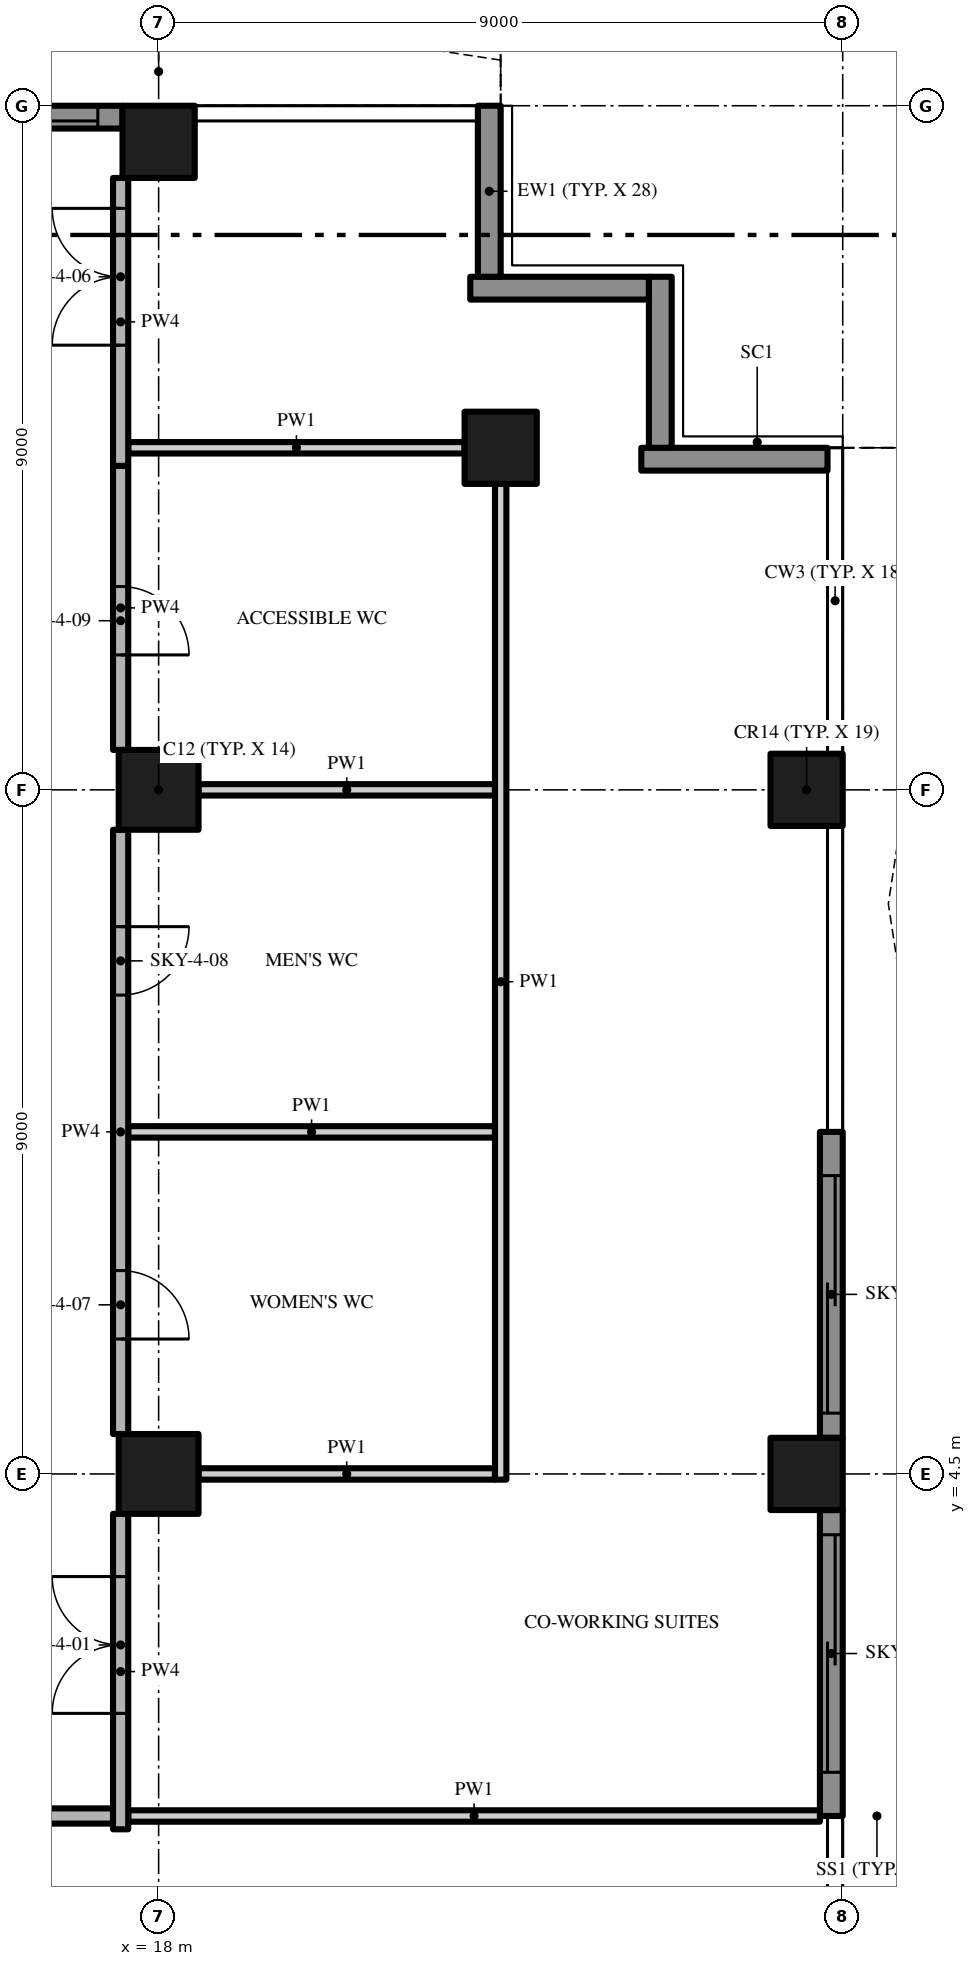
"""IFC4 building model, lengths in metres.
Left out: names, types, materials, properties, quantities, classifications, styles, units other than length and angle.
Written with IfcOpenShell. Run it as: python <this file> out.ifc"""

import sys

from ifc_helpers import new_model, si_unit, direction, frame, frame_2d, origin, origin_2d, place, context, subcontext, project, spatial, polyline, rectangle, outline, extrude, element, fill, save


model = new_model("IFC4")
c1 = context("Model", 3, precision=1e-05, world=origin(), true_north=direction((0.0, 1.0)))
c2 = subcontext(c1, "Body", "Model", "MODEL_VIEW")
j1 = project(units=[si_unit("LENGTHUNIT", "METRE"), si_unit("PLANEANGLEUNIT", "RADIAN")], contexts=[c1])
p1 = place(None, origin())
s1 = spatial("IfcSite", under=j1, at=p1, CompositionType="ELEMENT")
p2 = place(p1, origin())
s2 = spatial("IfcBuilding", under=s1, at=p2, CompositionType="ELEMENT")
p3 = place(p2, frame((0.0, 0.0, 233.8)))
s3 = spatial("IfcBuildingStorey", under=s2, at=p3, CompositionType="ELEMENT", Elevation=233.8)
p4 = place(p3, frame((18.0, 13.5, 0.0), z_axis=(0.0, 0.0, 1.0), x_axis=(1.0, 0.0, 0.0)))
e1 = element("IfcColumn", 1, at=p4, inside=s3, PredefinedType="COLUMN", context=c2, shape_type="SweptSolid", body=[
    extrude(rectangle(XDim=1.05, YDim=1.05, at=origin_2d()), origin(), (0.0, 0.0, 1.0), 4.7),
])
p5 = place(p3, frame((18.0, 22.025, 0.0), z_axis=(0.0, 0.0, 1.0), x_axis=(1.0, 0.0, 0.0)))
e2 = element("IfcColumn", 2, at=p5, inside=s3, PredefinedType="COLUMN", context=c2, shape_type="SweptSolid", body=[
    extrude(rectangle(XDim=0.95, YDim=0.95, at=origin_2d()), origin(), (0.0, 0.0, 1.0), 4.7),
])
p6 = place(p3, frame((18.0, 4.5, 0.0), z_axis=(0.0, 0.0, 1.0), x_axis=(1.0, 0.0, 0.0)))
e3 = element("IfcColumn", 3, at=p6, inside=s3, PredefinedType="COLUMN", context=c2, shape_type="SweptSolid", body=[
    extrude(rectangle(XDim=1.05, YDim=1.05, at=origin_2d()), origin(), (0.0, 0.0, 1.0), 4.7),
])
for number, where, z_axis, x_axis in (
    (4, (26.525, 13.5, 0.0), (0.0, 0.0, 1.0), (1.0, 0.0, 0.0)),
    (5, (22.5, 18.0, 0.0), (0.0, 0.0, 1.0), (1.0, 0.0, 0.0)),
    (6, (26.525, 4.5, 0.0), (0.0, 0.0, 1.0), (1.0, 0.0, 0.0)),
):
    element("IfcColumn", number, at=place(p3, frame(where, z_axis=z_axis, x_axis=x_axis)), inside=s3, PredefinedType="COLUMN", context=c2, shape_type="SweptSolid", body=[
        extrude(rectangle(XDim=0.95, YDim=0.95, at=origin_2d()), origin(), (0.0, 0.0, 1.0), 4.7),
    ])
p7 = place(p3, frame((26.85, 4.025, 0.0), z_axis=(0.0, 0.0, 1.0), x_axis=(0.0, -1.0, 0.0)))
e7 = element("IfcWall", 7, at=p7, inside=s3, PredefinedType="SOLIDWALL", context=c2, shape_type="SweptSolid", body=[
    extrude(rectangle(XDim=4.025, YDim=0.3, at=frame_2d((2.013, 0.0))), origin(), (0.0, 0.0, 1.0), 4.7),
])
p8 = place(p7, frame((0.325, 0.0, 0.0)))
e8 = element("IfcOpeningElement", 8, at=p8, cuts=e7, PredefinedType="OPENING", context=c2, shape_type="SweptSolid", body=[
    extrude(rectangle(XDim=3.125, YDim=2.4, at=frame_2d((1.562, 1.2))), frame((0.0, 0.16, 0.0), z_axis=(0.0, -1.0, 0.0), x_axis=(1.0, 0.0, 0.0)), (0.0, 0.0, 1.0), 0.32),
])
p9 = place(p3, frame((26.85, 9.0, 0.0), z_axis=(0.0, 0.0, 1.0), x_axis=(0.0, -1.0, 0.0)))
e9 = element("IfcWall", 9, at=p9, inside=s3, PredefinedType="SOLIDWALL", context=c2, shape_type="SweptSolid", body=[
    extrude(rectangle(XDim=4.025, YDim=0.3, at=frame_2d((2.013, 0.0))), origin(), (0.0, 0.0, 1.0), 4.7),
])
p10 = place(p9, frame((0.575, 0.0, 0.0)))
e10 = element("IfcOpeningElement", 10, at=p10, cuts=e9, PredefinedType="OPENING", context=c2, shape_type="SweptSolid", body=[
    extrude(rectangle(XDim=3.125, YDim=2.4, at=frame_2d((1.562, 1.2))), frame((0.0, 0.16, 0.0), z_axis=(0.0, -1.0, 0.0), x_axis=(1.0, 0.0, 0.0)), (0.0, 0.0, 1.0), 0.32),
])
p11 = place(p3, frame((24.35, 17.85, 0.0), z_axis=(0.0, 0.0, 1.0), x_axis=(1.0, 0.0, 0.0)))
e11 = element("IfcWall", 11, at=p11, inside=s3, PredefinedType="SOLIDWALL", context=c2, shape_type="SweptSolid", body=[
    extrude(rectangle(XDim=2.45, YDim=0.3, at=frame_2d((1.225, 0.0))), origin(), (0.0, 0.0, 1.0), 4.7),
])
p12 = place(p3, frame((24.6, 20.25, 0.0), z_axis=(0.0, 0.0, 1.0), x_axis=(0.0, -1.0, 0.0)))
e12 = element("IfcWall", 12, at=p12, inside=s3, PredefinedType="SOLIDWALL", context=c2, shape_type="SweptSolid", body=[
    extrude(rectangle(XDim=2.25, YDim=0.3, at=frame_2d((1.125, 0.0))), origin(), (0.0, 0.0, 1.0), 4.7),
])
p13 = place(p3, frame((22.1, 20.1, 0.0), z_axis=(0.0, 0.0, 1.0), x_axis=(1.0, 0.0, 0.0)))
e13 = element("IfcWall", 13, at=p13, inside=s3, PredefinedType="SOLIDWALL", context=c2, shape_type="SweptSolid", body=[
    extrude(rectangle(XDim=2.35, YDim=0.3, at=frame_2d((1.175, 0.0))), origin(), (0.0, 0.0, 1.0), 4.7),
])
p14 = place(p3, frame((22.35, 22.5, 0.0), z_axis=(0.0, 0.0, 1.0), x_axis=(0.0, -1.0, 0.0)))
e14 = element("IfcWall", 14, at=p14, inside=s3, PredefinedType="SOLIDWALL", context=c2, shape_type="SweptSolid", body=[
    extrude(rectangle(XDim=2.25, YDim=0.3, at=frame_2d((1.125, 0.0))), origin(), (0.0, 0.0, 1.0), 4.7),
])
p15 = place(p3, frame((13.5, 22.35, 0.0), z_axis=(0.0, 0.0, 1.0), x_axis=(1.0, 0.0, 0.0)))
e15 = element("IfcWall", 15, at=p15, inside=s3, PredefinedType="SOLIDWALL", context=c2, shape_type="SweptSolid", body=[
    extrude(rectangle(XDim=4.025, YDim=0.3, at=frame_2d((2.013, 0.0))), origin(), (0.0, 0.0, 1.0), 4.7),
])
p16 = place(p15, frame((0.575, 0.0, 0.0)))
e16 = element("IfcOpeningElement", 16, at=p16, cuts=e15, PredefinedType="OPENING", context=c2, shape_type="SweptSolid", body=[
    extrude(rectangle(XDim=3.125, YDim=2.4, at=frame_2d((1.562, 1.2))), frame((0.0, 0.16, 0.0), z_axis=(0.0, -1.0, 0.0), x_axis=(1.0, 0.0, 0.0)), (0.0, 0.0, 1.0), 0.32),
])
p17 = place(p3, origin())
e17 = element("IfcWall", 17, at=p17, inside=s3, PredefinedType="USERDEFINED", context=c2, shape_type="SweptSolid", body=[
    extrude(outline(polyline([(27.6, -18.0), (27.829, -16.5), (28.429, -15.0), (29.171, -13.5), (29.771, -12.0), (30.0, -10.5), (29.771, -9.0), (29.171, -7.5), (28.429, -6.0), (27.829, -4.5), (27.6, -3.0), (27.829, -1.5), (28.429, 0.0), (29.171, 1.5), (29.771, 3.0), (30.0, 4.5), (29.771, 6.0), (29.171, 7.5), (28.429, 9.0), (27.829, 10.5), (27.6, 12.0), (27.829, 13.5), (28.429, 15.0), (29.171, 16.5), (29.771, 18.0), (29.539, 18.093), (28.942, 16.602), (28.201, 15.102), (27.586, 13.566), (27.347, 12.0), (27.586, 10.434), (28.201, 8.898), (28.942, 7.398), (29.528, 5.934), (29.747, 4.5), (29.528, 3.066), (28.942, 1.602), (28.201, 0.102), (27.586, -1.434), (27.347, -3.0), (27.586, -4.566), (28.201, -6.102), (28.942, -7.602), (29.528, -9.066), (29.747, -10.5), (29.528, -11.934), (28.942, -13.398), (28.201, -14.898), (27.586, -16.434), (27.353, -17.962), (27.6, -18.0)])), origin(), (0.0, 0.0, 1.0), 0.9),
])
p18 = place(p3, origin())
e18 = element("IfcWall", 18, at=p18, inside=s3, PredefinedType="USERDEFINED", context=c2, shape_type="SweptSolid", body=[
    extrude(outline(polyline([(22.5, 23.1), (21.0, 23.329), (19.5, 23.929), (18.0, 24.671), (16.5, 25.271), (15.0, 25.5), (13.5, 25.271), (13.538, 25.024), (15.0, 25.247), (16.434, 25.028), (17.898, 24.442), (19.398, 23.701), (20.934, 23.086), (22.462, 22.853), (22.5, 23.1)])), origin(), (0.0, 0.0, 1.0), 0.9),
])
p19 = place(p3, frame((-17.4, 0.0, 0.0), z_axis=(0.0, 0.0, 1.0), x_axis=(1.0, 0.0, 0.0)))
e19 = element("IfcWall", 19, at=p19, inside=s3, PredefinedType="PARTITIONING", context=c2, shape_type="SweptSolid", body=[
    extrude(rectangle(XDim=34.8, YDim=0.2, at=frame_2d((17.4, 0.0))), origin(), (0.0, 0.0, 1.0), 4.7),
])
p20 = place(p19, frame((3.15, 0.0, 0.0)))
e20 = element("IfcOpeningElement", 20, at=p20, cuts=e19, PredefinedType="OPENING", context=c2, shape_type="SweptSolid", body=[
    extrude(rectangle(XDim=2.0, YDim=2.4, at=frame_2d((1.0, 1.2))), frame((0.0, 0.11, 0.0), z_axis=(0.0, -1.0, 0.0), x_axis=(1.0, 0.0, 0.0)), (0.0, 0.0, 1.0), 0.22),
])
p21 = place(p19, frame((16.4, 0.0, 0.0)))
e21 = element("IfcOpeningElement", 21, at=p21, cuts=e19, PredefinedType="OPENING", context=c2, shape_type="SweptSolid", body=[
    extrude(rectangle(XDim=2.0, YDim=2.4, at=frame_2d((1.0, 1.2))), frame((0.0, 0.11, 0.0), z_axis=(0.0, -1.0, 0.0), x_axis=(1.0, 0.0, 0.0)), (0.0, 0.0, 1.0), 0.22),
])
p22 = place(p19, frame((29.65, 0.0, 0.0)))
e22 = element("IfcOpeningElement", 22, at=p22, cuts=e19, PredefinedType="OPENING", context=c2, shape_type="SweptSolid", body=[
    extrude(rectangle(XDim=2.0, YDim=2.4, at=frame_2d((1.0, 1.2))), frame((0.0, 0.11, 0.0), z_axis=(0.0, -1.0, 0.0), x_axis=(1.0, 0.0, 0.0)), (0.0, 0.0, 1.0), 0.22),
])
p23 = place(p3, frame((17.6, 0.0, 0.0), z_axis=(0.0, 0.0, 1.0), x_axis=(1.0, 0.0, 0.0)))
e23 = element("IfcWall", 23, at=p23, inside=s3, PredefinedType="PARTITIONING", context=c2, shape_type="SweptSolid", body=[
    extrude(rectangle(XDim=9.1, YDim=0.15, at=frame_2d((4.55, 0.0))), origin(), (0.0, 0.0, 1.0), 4.7),
])
p24 = place(p3, frame((18.525, 4.5, 0.0), z_axis=(0.0, 0.0, 1.0), x_axis=(1.0, 0.0, 0.0)))
e24 = element("IfcWall", 24, at=p24, inside=s3, PredefinedType="PARTITIONING", context=c2, shape_type="SweptSolid", body=[
    extrude(rectangle(XDim=3.9, YDim=0.15, at=frame_2d((1.95, 0.0))), origin(), (0.0, 0.0, 1.0), 4.7),
])
p25 = place(p3, frame((17.6, 9.0, 0.0), z_axis=(0.0, 0.0, 1.0), x_axis=(1.0, 0.0, 0.0)))
e25 = element("IfcWall", 25, at=p25, inside=s3, PredefinedType="PARTITIONING", context=c2, shape_type="SweptSolid", body=[
    extrude(rectangle(XDim=4.825, YDim=0.15, at=frame_2d((2.413, 0.0))), origin(), (0.0, 0.0, 1.0), 4.7),
])
p26 = place(p3, frame((18.525, 13.5, 0.0), z_axis=(0.0, 0.0, 1.0), x_axis=(1.0, 0.0, 0.0)))
e26 = element("IfcWall", 26, at=p26, inside=s3, PredefinedType="PARTITIONING", context=c2, shape_type="SweptSolid", body=[
    extrude(rectangle(XDim=3.9, YDim=0.15, at=frame_2d((1.95, 0.0))), origin(), (0.0, 0.0, 1.0), 4.7),
])
p27 = place(p3, frame((17.6, 18.0, 0.0), z_axis=(0.0, 0.0, 1.0), x_axis=(1.0, 0.0, 0.0)))
e27 = element("IfcWall", 27, at=p27, inside=s3, PredefinedType="PARTITIONING", context=c2, shape_type="SweptSolid", body=[
    extrude(rectangle(XDim=4.425, YDim=0.15, at=frame_2d((2.212, 0.0))), origin(), (0.0, 0.0, 1.0), 4.7),
])
p28 = place(p3, frame((17.5, -0.175, 0.0), z_axis=(0.0, 0.0, 1.0), x_axis=(0.0, 1.0, 0.0)))
e28 = element("IfcWall", 28, at=p28, inside=s3, PredefinedType="PARTITIONING", context=c2, shape_type="SweptSolid", body=[
    extrude(rectangle(XDim=4.15, YDim=0.2, at=frame_2d((2.075, 0.0))), origin(), (0.0, 0.0, 1.0), 4.7),
])
p29 = place(p28, frame((1.525, 0.0, 0.0)))
e29 = element("IfcOpeningElement", 29, at=p29, cuts=e28, PredefinedType="OPENING", context=c2, shape_type="SweptSolid", body=[
    extrude(rectangle(XDim=1.8, YDim=2.4, at=frame_2d((0.9, 1.2))), frame((0.0, 0.11, 0.0), z_axis=(0.0, -1.0, 0.0), x_axis=(1.0, 0.0, 0.0)), (0.0, 0.0, 1.0), 0.22),
])
p30 = place(p3, frame((17.5, 12.975, 0.0), z_axis=(0.0, 0.0, 1.0), x_axis=(0.0, -1.0, 0.0)))
e30 = element("IfcWall", 30, at=p30, inside=s3, PredefinedType="PARTITIONING", context=c2, shape_type="SweptSolid", body=[
    extrude(rectangle(XDim=7.95, YDim=0.2, at=frame_2d((3.975, 0.0))), origin(), (0.0, 0.0, 1.0), 4.7),
])
p31 = place(p30, frame((5.8, 0.0, 0.0)))
e31 = element("IfcOpeningElement", 31, at=p31, cuts=e30, PredefinedType="OPENING", context=c2, shape_type="SweptSolid", body=[
    extrude(rectangle(XDim=0.9, YDim=2.1, at=frame_2d((0.45, 1.05))), frame((0.0, 0.11, 0.0), z_axis=(0.0, -1.0, 0.0), x_axis=(1.0, 0.0, 0.0)), (0.0, 0.0, 1.0), 0.22),
])
p32 = place(p30, frame((1.275, 0.0, 0.0)))
e32 = element("IfcOpeningElement", 32, at=p32, cuts=e30, PredefinedType="OPENING", context=c2, shape_type="SweptSolid", body=[
    extrude(rectangle(XDim=0.9, YDim=2.1, at=frame_2d((0.45, 1.05))), frame((0.0, 0.11, 0.0), z_axis=(0.0, -1.0, 0.0), x_axis=(1.0, 0.0, 0.0)), (0.0, 0.0, 1.0), 0.22),
])
p33 = place(p3, frame((17.5, 17.762, 0.0), z_axis=(0.0, 0.0, 1.0), x_axis=(0.0, -1.0, 0.0)))
e33 = element("IfcWall", 33, at=p33, inside=s3, PredefinedType="PARTITIONING", context=c2, shape_type="SweptSolid", body=[
    extrude(rectangle(XDim=3.737, YDim=0.2, at=frame_2d((1.869, 0.0))), origin(), (0.0, 0.0, 1.0), 4.7),
])
p34 = place(p33, frame((1.587, 0.0, 0.0)))
e34 = element("IfcOpeningElement", 34, at=p34, cuts=e33, PredefinedType="OPENING", context=c2, shape_type="SweptSolid", body=[
    extrude(rectangle(XDim=0.9, YDim=2.1, at=frame_2d((0.45, 1.05))), frame((0.0, 0.11, 0.0), z_axis=(0.0, -1.0, 0.0), x_axis=(1.0, 0.0, 0.0)), (0.0, 0.0, 1.0), 0.22),
])
p35 = place(p3, frame((17.5, 17.762, 0.0), z_axis=(0.0, 0.0, 1.0), x_axis=(0.0, 1.0, 0.0)))
e35 = element("IfcWall", 35, at=p35, inside=s3, PredefinedType="PARTITIONING", context=c2, shape_type="SweptSolid", body=[
    extrude(rectangle(XDim=3.788, YDim=0.2, at=frame_2d((1.894, 0.0))), origin(), (0.0, 0.0, 1.0), 4.7),
])
p36 = place(p35, frame((1.587, 0.0, 0.0)))
e36 = element("IfcOpeningElement", 36, at=p36, cuts=e35, PredefinedType="OPENING", context=c2, shape_type="SweptSolid", body=[
    extrude(rectangle(XDim=1.8, YDim=2.4, at=frame_2d((0.9, 1.2))), frame((0.0, 0.11, 0.0), z_axis=(0.0, -1.0, 0.0), x_axis=(1.0, 0.0, 0.0)), (0.0, 0.0, 1.0), 0.22),
])
p37 = place(p3, frame((22.5, 4.425, 0.0), z_axis=(0.0, 0.0, 1.0), x_axis=(0.0, 1.0, 0.0)))
e37 = element("IfcWall", 37, at=p37, inside=s3, PredefinedType="PARTITIONING", context=c2, shape_type="SweptSolid", body=[
    extrude(rectangle(XDim=13.1, YDim=0.15, at=frame_2d((6.55, 0.0))), origin(), (0.0, 0.0, 1.0), 4.7),
])
p38 = place(p8, origin())
e38 = element("IfcDoor", 38, at=p38, inside=s3, OperationType="SINGLE_SWING_LEFT", PredefinedType="DOOR", context=c2, shape_type="SweptSolid", body=[
    extrude(rectangle(XDim=3.125, YDim=2.4, at=frame_2d((1.562, 1.2))), frame((0.0, 0.025, 0.0), z_axis=(0.0, -1.0, 0.0), x_axis=(1.0, 0.0, 0.0)), (0.0, 0.0, 1.0), 0.05),
])
fill(e8, e38)
p39 = place(p10, origin())
e39 = element("IfcDoor", 39, at=p39, inside=s3, OperationType="SINGLE_SWING_LEFT", PredefinedType="DOOR", context=c2, shape_type="SweptSolid", body=[
    extrude(rectangle(XDim=3.125, YDim=2.4, at=frame_2d((1.562, 1.2))), frame((0.0, 0.025, 0.0), z_axis=(0.0, -1.0, 0.0), x_axis=(1.0, 0.0, 0.0)), (0.0, 0.0, 1.0), 0.05),
])
fill(e10, e39)
p40 = place(p16, origin())
e40 = element("IfcDoor", 40, at=p40, inside=s3, OperationType="SINGLE_SWING_LEFT", PredefinedType="DOOR", context=c2, shape_type="SweptSolid", body=[
    extrude(rectangle(XDim=3.125, YDim=2.4, at=frame_2d((1.562, 1.2))), frame((0.0, 0.025, 0.0), z_axis=(0.0, -1.0, 0.0), x_axis=(1.0, 0.0, 0.0)), (0.0, 0.0, 1.0), 0.05),
])
fill(e16, e40)
p41 = place(p29, origin())
e41 = element("IfcDoor", 41, at=p41, inside=s3, OperationType="DOUBLE_DOOR_SINGLE_SWING", PredefinedType="DOOR", context=c2, shape_type="SweptSolid", body=[
    extrude(rectangle(XDim=1.8, YDim=2.4, at=frame_2d((0.9, 1.2))), frame((0.0, 0.025, 0.0), z_axis=(0.0, -1.0, 0.0), x_axis=(1.0, 0.0, 0.0)), (0.0, 0.0, 1.0), 0.05),
])
fill(e29, e41)
p42 = place(p36, origin())
e42 = element("IfcDoor", 42, at=p42, inside=s3, OperationType="DOUBLE_DOOR_SINGLE_SWING", PredefinedType="DOOR", context=c2, shape_type="SweptSolid", body=[
    extrude(rectangle(XDim=1.8, YDim=2.4, at=frame_2d((0.9, 1.2))), frame((0.0, 0.025, 0.0), z_axis=(0.0, -1.0, 0.0), x_axis=(1.0, 0.0, 0.0)), (0.0, 0.0, 1.0), 0.05),
])
fill(e36, e42)
p43 = place(p31, origin())
e43 = element("IfcDoor", 43, at=p43, inside=s3, OperationType="SINGLE_SWING_RIGHT", PredefinedType="DOOR", context=c2, shape_type="SweptSolid", body=[
    extrude(rectangle(XDim=0.9, YDim=2.1, at=frame_2d((0.45, 1.05))), frame((0.0, 0.025, 0.0), z_axis=(0.0, -1.0, 0.0), x_axis=(1.0, 0.0, 0.0)), (0.0, 0.0, 1.0), 0.05),
])
fill(e31, e43)
p44 = place(p32, origin())
e44 = element("IfcDoor", 44, at=p44, inside=s3, OperationType="SINGLE_SWING_LEFT", PredefinedType="DOOR", context=c2, shape_type="SweptSolid", body=[
    extrude(rectangle(XDim=0.9, YDim=2.1, at=frame_2d((0.45, 1.05))), frame((0.0, 0.025, 0.0), z_axis=(0.0, -1.0, 0.0), x_axis=(1.0, 0.0, 0.0)), (0.0, 0.0, 1.0), 0.05),
])
fill(e32, e44)
p45 = place(p34, origin())
e45 = element("IfcDoor", 45, at=p45, inside=s3, OperationType="SINGLE_SWING_RIGHT", PredefinedType="DOOR", context=c2, shape_type="SweptSolid", body=[
    extrude(rectangle(XDim=0.9, YDim=2.1, at=frame_2d((0.45, 1.05))), frame((0.0, 0.025, 0.0), z_axis=(0.0, -1.0, 0.0), x_axis=(1.0, 0.0, 0.0)), (0.0, 0.0, 1.0), 0.05),
])
fill(e34, e45)
save(model, sys.argv[1])
